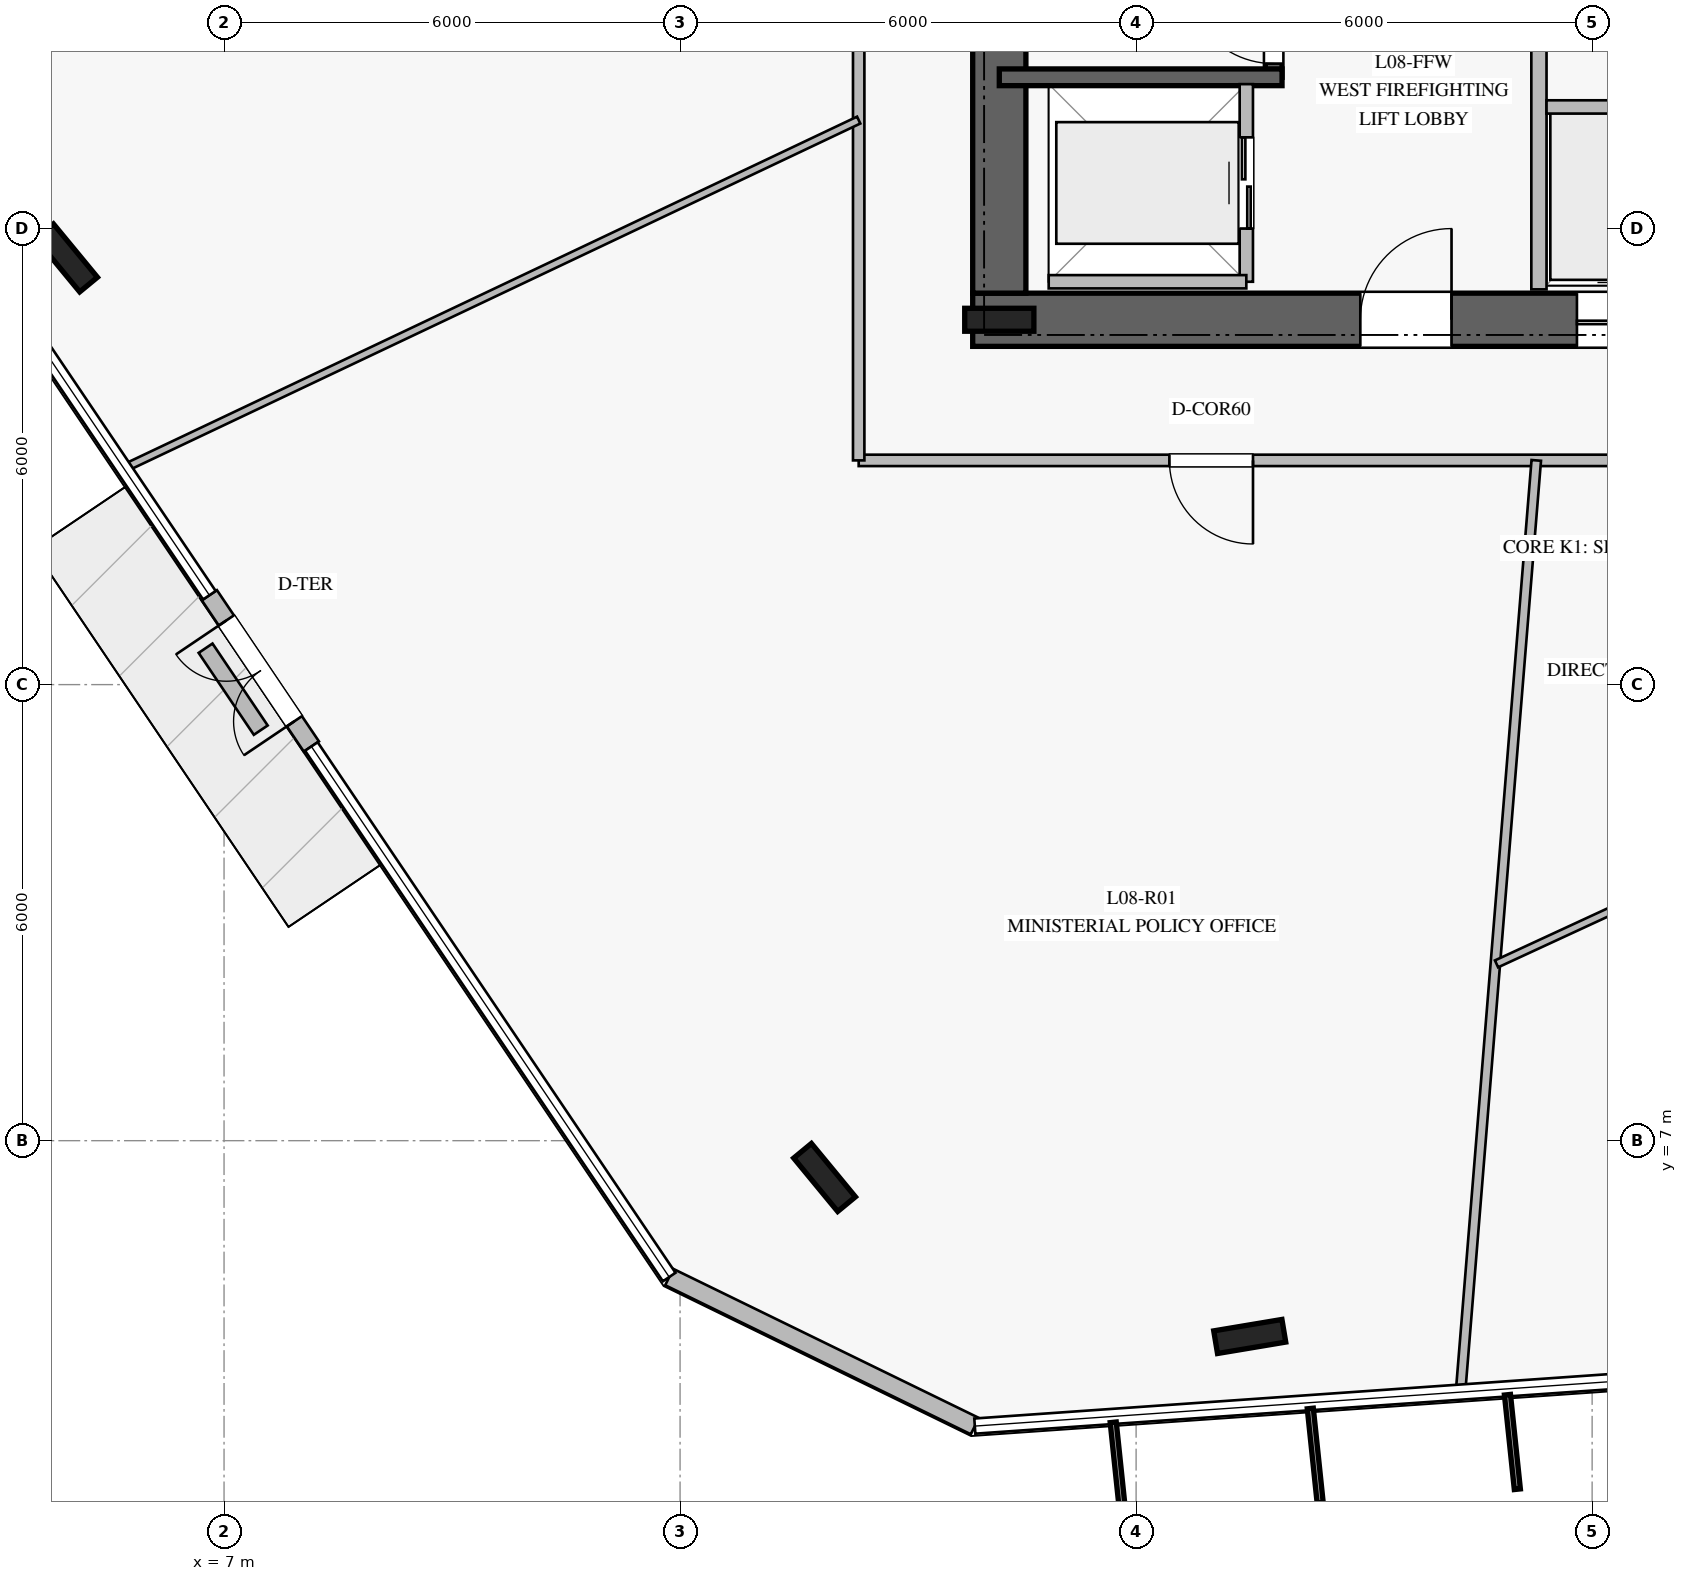
"""IFC4 building model, lengths in metres.
Left out: names, types, materials, properties, quantities, classifications, styles, units other than length and angle.
Written with IfcOpenShell. Run it as: python <this file> out.ifc"""

import sys

from ifc_helpers import new_model, si_unit, direction, frame, frame_2d, origin, origin_2d, place, context, subcontext, project, spatial, rectangle, i_section, extrude, element, fill, save


model = new_model("IFC4")
c1 = context("Model", 3, precision=1e-05, world=origin(), true_north=direction((0.0, 1.0)))
c2 = subcontext(c1, "Body", "Model", "MODEL_VIEW")
j1 = project(units=[si_unit("LENGTHUNIT", "METRE"), si_unit("PLANEANGLEUNIT", "RADIAN")], contexts=[c1])
p1 = place(None, origin())
s1 = spatial("IfcSite", under=j1, at=p1, CompositionType="ELEMENT")
p2 = place(p1, origin())
s2 = spatial("IfcBuilding", under=s1, at=p2, CompositionType="ELEMENT")
p3 = place(p2, frame((0.0, 0.0, 36.0)))
s3 = spatial("IfcBuildingStorey", under=s2, at=p3, CompositionType="ELEMENT", Elevation=36.0)
p4 = place(p3, frame((16.85, 17.8, 0.0), z_axis=(0.0, 0.0, 1.0), x_axis=(1.0, 0.0, 0.0)))
e1 = element("IfcWall", 1, at=p4, inside=s3, PredefinedType="SHEAR", context=c2, shape_type="SweptSolid", body=[
    extrude(rectangle(XDim=16.3, YDim=0.7, at=frame_2d((8.15, 0.0))), origin(), (0.0, 0.0, 1.0), 3.76),
])
p5 = place(p4, frame((5.1, 0.0, 0.0)))
e2 = element("IfcOpeningElement", 2, at=p5, cuts=e1, PredefinedType="OPENING", context=c2, shape_type="SweptSolid", body=[
    extrude(rectangle(XDim=1.2, YDim=2.25, at=frame_2d((0.6, 1.125))), frame((0.0, 0.36, 0.0), z_axis=(0.0, -1.0, 0.0), x_axis=(1.0, 0.0, 0.0)), (0.0, 0.0, 1.0), 0.72),
])
p6 = place(p4, frame((14.05, 0.0, 0.0)))
e3 = element("IfcOpeningElement", 3, at=p6, cuts=e1, PredefinedType="OPENING", context=c2, shape_type="SweptSolid", body=[
    extrude(rectangle(XDim=0.9, YDim=2.1, at=frame_2d((0.45, 1.05))), frame((0.0, 0.36, 0.0), z_axis=(0.0, -1.0, 0.0), x_axis=(1.0, 0.0, 0.0)), (0.0, 0.0, 1.0), 0.72),
])
p7 = place(p4, frame((7.95, 0.0, 0.0)))
e4 = element("IfcOpeningElement", 4, at=p7, cuts=e1, PredefinedType="OPENING", context=c2, shape_type="SweptSolid", body=[
    extrude(rectangle(XDim=1.1, YDim=2.2, at=frame_2d((0.55, 1.1))), frame((0.0, 0.36, 0.0), z_axis=(0.0, -1.0, 0.0), x_axis=(1.0, 0.0, 0.0)), (0.0, 0.0, 1.0), 0.72),
])
p8 = place(p4, frame((9.925, 0.0, 0.0)))
e5 = element("IfcOpeningElement", 5, at=p8, cuts=e1, PredefinedType="OPENING", context=c2, shape_type="SweptSolid", body=[
    extrude(rectangle(XDim=1.1, YDim=2.2, at=frame_2d((0.55, 1.1))), frame((0.0, 0.36, 0.0), z_axis=(0.0, -1.0, 0.0), x_axis=(1.0, 0.0, 0.0)), (0.0, 0.0, 1.0), 0.72),
])
p9 = place(p4, frame((11.9, 0.0, 0.0)))
e6 = element("IfcOpeningElement", 6, at=p9, cuts=e1, PredefinedType="OPENING", context=c2, shape_type="SweptSolid", body=[
    extrude(rectangle(XDim=1.1, YDim=2.2, at=frame_2d((0.55, 1.1))), frame((0.0, 0.36, 0.0), z_axis=(0.0, -1.0, 0.0), x_axis=(1.0, 0.0, 0.0)), (0.0, 0.0, 1.0), 0.72),
])
p10 = place(p3, frame((17.2, 31.85, 0.0), z_axis=(0.0, 0.0, 1.0), x_axis=(0.0, -1.0, 0.0)))
e7 = element("IfcWall", 7, at=p10, inside=s3, PredefinedType="SHEAR", context=c2, shape_type="SweptSolid", body=[
    extrude(rectangle(XDim=13.7, YDim=0.7, at=frame_2d((6.85, 0.0))), origin(), (0.0, 0.0, 1.0), 3.76),
])
p11 = place(p10, frame((2.0, 0.0, 0.0)))
e8 = element("IfcOpeningElement", 8, at=p11, cuts=e7, PredefinedType="OPENING", context=c2, shape_type="SweptSolid", body=[
    extrude(rectangle(XDim=1.5, YDim=2.2, at=frame_2d((0.75, 1.1))), frame((0.0, 0.36, 0.0), z_axis=(0.0, -1.0, 0.0), x_axis=(1.0, 0.0, 0.0)), (0.0, 0.0, 1.0), 0.72),
])
p12 = place(p3, frame((17.2, 17.8, 0.0), z_axis=(0.0, 0.0, 1.0), x_axis=(1.0, 0.0, 0.0)))
e9 = element("IfcColumn", 9, at=p12, inside=s3, PredefinedType="COLUMN", context=c2, shape_type="SweptSolid", body=[
    extrude(i_section(OverallWidth=0.302, OverallDepth=0.91, WebThickness=0.021, FlangeThickness=0.04, at=origin_2d()), origin(), (0.0, 0.0, 1.0), 4.0),
])
p13 = place(p3, frame((20.81, 20.99, 0.0), z_axis=(0.0, 0.0, 1.0), x_axis=(0.0, 1.0, 0.0)))
e10 = element("IfcWall", 10, at=p13, inside=s3, PredefinedType="SOLIDWALL", context=c2, shape_type="SweptSolid", body=[
    extrude(rectangle(XDim=7.22, YDim=0.22, at=frame_2d((3.61, 0.0))), origin(), (0.0, 0.0, 1.0), 3.76),
])
p14 = place(p13, frame((0.18, 0.0, 0.0)))
e11 = element("IfcOpeningElement", 11, at=p14, cuts=e10, PredefinedType="OPENING", context=c2, shape_type="SweptSolid", body=[
    extrude(rectangle(XDim=1.15, YDim=2.2, at=frame_2d((0.575, 1.1))), frame((0.0, 0.12, 0.0), z_axis=(0.0, -1.0, 0.0), x_axis=(1.0, 0.0, 0.0)), (0.0, 0.0, 1.0), 0.24),
])
p15 = place(p3, frame((17.2, 20.99, 0.0), z_axis=(0.0, 0.0, 1.0), x_axis=(1.0, 0.0, 0.0)))
e12 = element("IfcWall", 12, at=p15, inside=s3, PredefinedType="SOLIDWALL", context=c2, shape_type="SweptSolid", body=[
    extrude(rectangle(XDim=3.72, YDim=0.22, at=frame_2d((1.86, 0.0))), origin(), (0.0, 0.0, 1.0), 3.76),
])
for number, where, z_axis, x_axis in (
    (13, (4.928, 18.614, 0.0), (0.0, 0.0, 1.0), (-0.636, 0.772, 0.0)),
    (14, (14.901, 6.516, 0.0), (0.0, 0.0, 1.0), (-0.636, 0.772, 0.0)),
    (15, (20.495, 4.424, 0.0), (0.0, 0.0, 1.0), (0.986, 0.165, 0.0)),
):
    element("IfcColumn", number, at=place(p3, frame(where, z_axis=z_axis, x_axis=x_axis)), inside=s3, PredefinedType="COLUMN", context=c2, shape_type="SweptSolid", body=[
        extrude(i_section(OverallWidth=0.302, OverallDepth=0.91, WebThickness=0.021, FlangeThickness=0.04, at=origin_2d()), origin(), (0.0, 0.0, 1.0), 4.0),
    ])
p16 = place(p3, frame((6.807, 14.176, 0.0), z_axis=(0.0, 0.0, 1.0), x_axis=(0.559128660759, -0.82908090119, 0.0)))
e16 = element("IfcWall", 16, at=p16, inside=s3, PredefinedType="STANDARD", context=c2, shape_type="SweptSolid", body=[
    extrude(rectangle(XDim=2.4, YDim=0.24, at=frame_2d((1.2, 0.0))), origin(), (0.0, 0.0, 1.0), 3.76),
])
p17 = place(p16, frame((0.4, 0.0, 0.0)))
e17 = element("IfcOpeningElement", 17, at=p17, cuts=e16, PredefinedType="OPENING", context=c2, shape_type="SweptSolid", body=[
    extrude(rectangle(XDim=1.6, YDim=2.25, at=frame_2d((0.8, 1.125))), frame((0.0, 0.13, 0.0), z_axis=(0.0, -1.0, 0.0), x_axis=(1.0, 0.0, 0.0)), (0.0, 0.0, 1.0), 0.26),
])
p18 = place(p3, frame((12.857, 5.206, 0.0), z_axis=(0.0, 0.0, 1.0), x_axis=(0.898814595488, -0.438329012202, 0.0)))
e18 = element("IfcWall", 18, at=p18, inside=s3, PredefinedType="STANDARD", context=c2, shape_type="SweptSolid", body=[
    extrude(rectangle(XDim=4.474, YDim=0.24, at=frame_2d((2.237, 0.0))), origin(), (0.0, 0.0, 1.0), 3.76),
])
p19 = place(p3, frame((6.757, 13.479, 0.0), z_axis=(0.0, 0.0, 1.0), x_axis=(0.558465865857, -0.829527502059, 0.0)))
e19 = element("IfcWall", 19, at=p19, inside=s3, PredefinedType="USERDEFINED", context=c2, shape_type="SweptSolid", body=[
    extrude(rectangle(XDim=1.3, YDim=0.22, at=frame_2d((0.65, 0.0))), origin(), (0.0, 0.0, 1.0), 0.4),
])
p20 = place(p3, frame((24.3, 18.2, 0.0), z_axis=(0.0, 0.0, 1.0), x_axis=(0.0, 1.0, 0.0)))
e20 = element("IfcWall", 20, at=p20, inside=s3, PredefinedType="PARTITIONING", context=c2, shape_type="SweptSolid", body=[
    extrude(rectangle(XDim=5.15, YDim=0.2, at=frame_2d((2.575, 0.0))), origin(), (0.0, 0.0, 1.0), 3.76),
])
p21 = place(p3, frame((24.4, 20.6, 0.0), z_axis=(0.0, 0.0, 1.0), x_axis=(1.0, 0.0, 0.0)))
e21 = element("IfcWall", 21, at=p21, inside=s3, PredefinedType="PARTITIONING", context=c2, shape_type="SweptSolid", body=[
    extrude(rectangle(XDim=1.9, YDim=0.175, at=frame_2d((0.95, 0.0))), origin(), (0.0, 0.0, 1.0), 3.76),
])
p22 = place(p3, frame((20.45, 18.3, 0.0), z_axis=(0.0, 0.0, 1.0), x_axis=(0.0, 1.0, 0.0)))
e22 = element("IfcWall", 22, at=p22, inside=s3, PredefinedType="PARTITIONING", context=c2, shape_type="SweptSolid", body=[
    extrude(rectangle(XDim=2.6, YDim=0.175, at=frame_2d((1.3, 0.0))), origin(), (0.0, 0.0, 1.0), 3.76),
])
p23 = place(p22, frame((0.7, 0.0, 0.0)))
e23 = element("IfcOpeningElement", 23, at=p23, cuts=e22, PredefinedType="OPENING", context=c2, shape_type="SweptSolid", body=[
    extrude(rectangle(XDim=1.2, YDim=2.2, at=frame_2d((0.6, 1.1))), frame((0.0, 0.098, 0.0), z_axis=(0.0, -1.0, 0.0), x_axis=(1.0, 0.0, 0.0)), (0.0, 0.0, 1.0), 0.195),
])
p24 = place(p3, frame((17.85, 18.3, 0.0), z_axis=(0.0, 0.0, 1.0), x_axis=(1.0, 0.0, 0.0)))
e24 = element("IfcWall", 24, at=p24, inside=s3, PredefinedType="PARTITIONING", context=c2, shape_type="SweptSolid", body=[
    extrude(rectangle(XDim=2.6, YDim=0.175, at=frame_2d((1.3, 0.0))), origin(), (0.0, 0.0, 1.0), 3.76),
])
p25 = place(p3, frame((34.65, 15.95, 0.0), z_axis=(0.0, 0.0, 1.0), x_axis=(-1.0, 0.0, 0.0)))
e25 = element("IfcWall", 25, at=p25, inside=s3, PredefinedType="PARTITIONING", context=c2, shape_type="SweptSolid", body=[
    extrude(rectangle(XDim=19.3, YDim=0.15, at=frame_2d((9.65, 0.0))), origin(), (0.0, 0.0, 1.0), 3.21),
])
p26 = place(p25, frame((14.112, 0.0, 0.0)))
e26 = element("IfcOpeningElement", 26, at=p26, cuts=e25, PredefinedType="OPENING", context=c2, shape_type="SweptSolid", body=[
    extrude(rectangle(XDim=1.1, YDim=2.2, at=frame_2d((0.55, 1.1))), frame((0.0, 0.085, 0.0), z_axis=(0.0, -1.0, 0.0), x_axis=(1.0, 0.0, 0.0)), (0.0, 0.0, 1.0), 0.17),
])
p27 = place(p25, frame((4.829, 0.0, 0.0)))
e27 = element("IfcOpeningElement", 27, at=p27, cuts=e25, PredefinedType="OPENING", context=c2, shape_type="SweptSolid", body=[
    extrude(rectangle(XDim=1.1, YDim=2.2, at=frame_2d((0.55, 1.1))), frame((0.0, 0.085, 0.0), z_axis=(0.0, -1.0, 0.0), x_axis=(1.0, 0.0, 0.0)), (0.0, 0.0, 1.0), 0.17),
])
p28 = place(p3, frame((15.35, 15.95, 0.0), z_axis=(0.0, 0.0, 1.0), x_axis=(0.0, 1.0, 0.0)))
e28 = element("IfcWall", 28, at=p28, inside=s3, PredefinedType="PARTITIONING", context=c2, shape_type="SweptSolid", body=[
    extrude(rectangle(XDim=18.1, YDim=0.15, at=frame_2d((9.05, 0.0))), origin(), (0.0, 0.0, 1.0), 3.21),
])
p29 = place(p28, frame((9.559, 0.0, 0.0)))
e29 = element("IfcOpeningElement", 29, at=p29, cuts=e28, PredefinedType="OPENING", context=c2, shape_type="SweptSolid", body=[
    extrude(rectangle(XDim=1.1, YDim=2.2, at=frame_2d((0.55, 1.1))), frame((0.0, 0.085, 0.0), z_axis=(0.0, -1.0, 0.0), x_axis=(1.0, 0.0, 0.0)), (0.0, 0.0, 1.0), 0.17),
])
p30 = place(p3, frame((15.35, 20.427, 0.0), z_axis=(0.0, 0.0, 1.0), x_axis=(-0.90363263024, -0.428308381385, 0.0)))
e30 = element("IfcWall", 30, at=p30, inside=s3, PredefinedType="MOVABLE", context=c2, shape_type="SweptSolid", body=[
    extrude(rectangle(XDim=10.681, YDim=0.1, at=frame_2d((5.341, 0.0))), origin(), (0.0, 0.0, 1.0), 3.06),
])
p31 = place(p3, frame((24.265, 15.95, 0.0), z_axis=(0.0, 0.0, 1.0), x_axis=(-0.081013374565, -0.996713014434, 0.0)))
e31 = element("IfcWall", 31, at=p31, inside=s3, PredefinedType="PARTITIONING", context=c2, shape_type="SweptSolid", body=[
    extrude(rectangle(XDim=12.28, YDim=0.125, at=frame_2d((6.14, 0.0))), origin(), (0.0, 0.0, 1.0), 3.05),
])
p32 = place(p3, frame((23.742, 9.326, 0.0), z_axis=(0.0, 0.0, 1.0), x_axis=(0.907733462567, 0.419547328601, 0.0)))
e32 = element("IfcWall", 32, at=p32, inside=s3, PredefinedType="MOVABLE", context=c2, shape_type="SweptSolid", body=[
    extrude(rectangle(XDim=14.494, YDim=0.1, at=frame_2d((7.247, 0.0))), origin(), (0.0, 0.0, 1.0), 3.05),
])
p33 = place(p32, frame((6.747, 0.0, 0.0)))
e33 = element("IfcOpeningElement", 33, at=p33, cuts=e32, PredefinedType="OPENING", context=c2, shape_type="SweptSolid", body=[
    extrude(rectangle(XDim=1.0, YDim=2.15, at=frame_2d((0.5, 1.075))), frame((0.0, 0.06, 0.0), z_axis=(0.0, -1.0, 0.0), x_axis=(1.0, 0.0, 0.0)), (0.0, 0.0, 1.0), 0.12),
])
p34 = place(p17, frame((1.6, 0.0, 0.0), z_axis=(0.0, 0.0, 1.0), x_axis=(-1.0, 0.0, 0.0)))
e34 = element("IfcDoor", 34, at=p34, inside=s3, OperationType="DOUBLE_DOOR_SINGLE_SWING", PredefinedType="DOOR", context=c2, shape_type="SweptSolid", body=[
    extrude(rectangle(XDim=1.6, YDim=2.25, at=frame_2d((0.8, 1.125))), frame((0.0, 0.025, 0.0), z_axis=(0.0, -1.0, 0.0), x_axis=(1.0, 0.0, 0.0)), (0.0, 0.0, 1.0), 0.05),
])
fill(e17, e34)
p35 = place(p14, origin())
e35 = element("IfcDoor", 35, at=p35, inside=s3, OperationType="SINGLE_SWING_RIGHT", PredefinedType="DOOR", context=c2, shape_type="SweptSolid", body=[
    extrude(rectangle(XDim=1.15, YDim=2.2, at=frame_2d((0.575, 1.1))), frame((0.0, 0.025, 0.0), z_axis=(0.0, -1.0, 0.0), x_axis=(1.0, 0.0, 0.0)), (0.0, 0.0, 1.0), 0.05),
])
fill(e11, e35)
p36 = place(p5, origin())
e36 = element("IfcDoor", 36, at=p36, inside=s3, OperationType="SINGLE_SWING_RIGHT", PredefinedType="DOOR", context=c2, shape_type="SweptSolid", body=[
    extrude(rectangle(XDim=1.2, YDim=2.25, at=frame_2d((0.6, 1.125))), frame((0.0, 0.025, 0.0), z_axis=(0.0, -1.0, 0.0), x_axis=(1.0, 0.0, 0.0)), (0.0, 0.0, 1.0), 0.05),
])
fill(e2, e36)
p37 = place(p7, origin())
e37 = element("IfcDoor", 37, at=p37, inside=s3, OperationType="DOUBLE_DOOR_SLIDING", PredefinedType="DOOR", context=c2, shape_type="SweptSolid", body=[
    extrude(rectangle(XDim=1.1, YDim=2.2, at=frame_2d((0.55, 1.1))), frame((0.0, 0.025, 0.0), z_axis=(0.0, -1.0, 0.0), x_axis=(1.0, 0.0, 0.0)), (0.0, 0.0, 1.0), 0.05),
])
fill(e4, e37)
p38 = place(p23, origin())
e38 = element("IfcDoor", 38, at=p38, inside=s3, OperationType="DOUBLE_DOOR_SLIDING", PredefinedType="DOOR", context=c2, shape_type="SweptSolid", body=[
    extrude(rectangle(XDim=1.2, YDim=2.2, at=frame_2d((0.6, 1.1))), frame((0.0, 0.025, 0.0), z_axis=(0.0, -1.0, 0.0), x_axis=(1.0, 0.0, 0.0)), (0.0, 0.0, 1.0), 0.05),
])
fill(e23, e38)
p39 = place(p26, origin())
e39 = element("IfcDoor", 39, at=p39, inside=s3, OperationType="SINGLE_SWING_LEFT", PredefinedType="DOOR", context=c2, shape_type="SweptSolid", body=[
    extrude(rectangle(XDim=1.1, YDim=2.2, at=frame_2d((0.55, 1.1))), frame((0.0, 0.025, 0.0), z_axis=(0.0, -1.0, 0.0), x_axis=(1.0, 0.0, 0.0)), (0.0, 0.0, 1.0), 0.05),
])
fill(e26, e39)
save(model, sys.argv[1])
